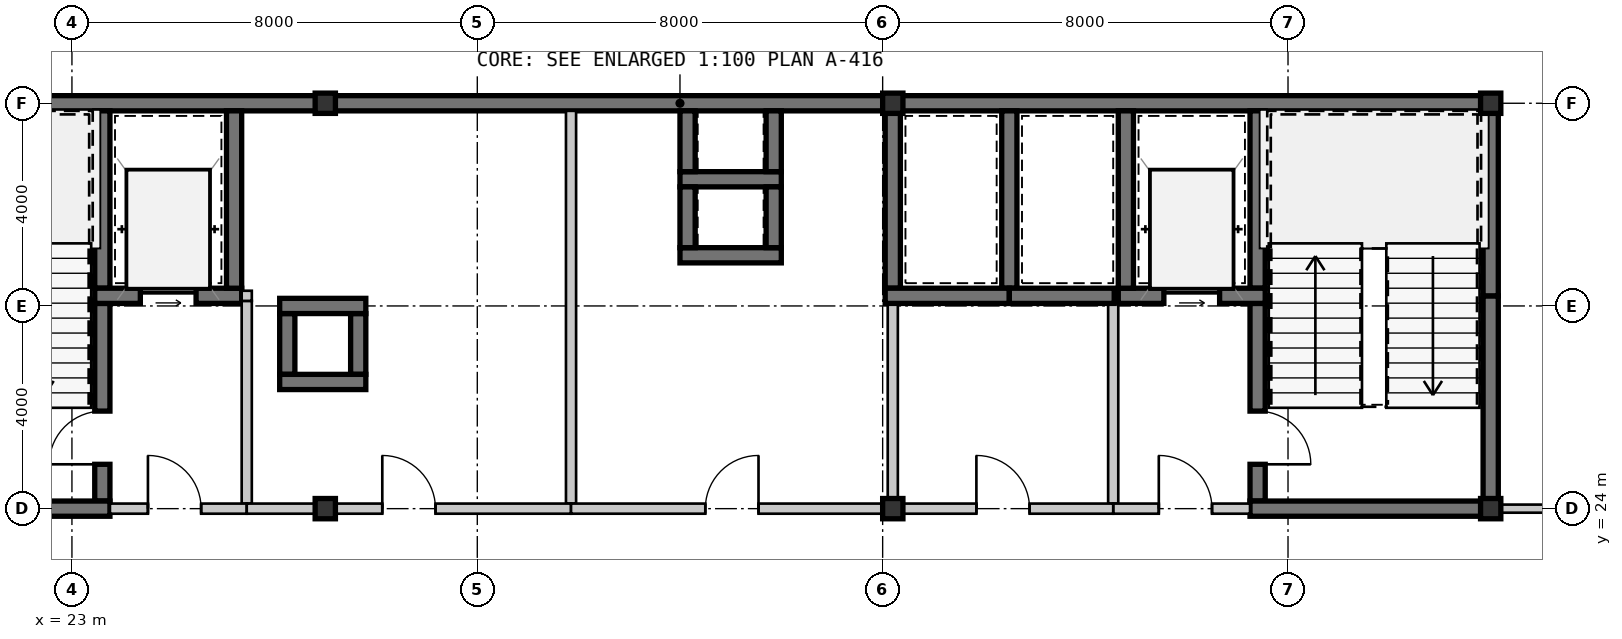
"""IFC4 building model, lengths in metres.
Left out: names, types, materials, properties, quantities, classifications, styles, units other than length and angle.
Written with IfcOpenShell. Run it as: python <this file> out.ifc"""

import sys

from ifc_helpers import new_model, si_unit, direction, frame, frame_2d, origin, origin_2d, place, context, subcontext, project, spatial, rectangle, hollow_rectangle, extrude, source, transform, mapped, element, fill, save


model = new_model("IFC4")
c1 = context("Model", 3, precision=1e-05, world=origin(), true_north=direction((0.0, 1.0)))
c2 = subcontext(c1, "Body", "Model", "MODEL_VIEW")
j1 = project(units=[si_unit("LENGTHUNIT", "METRE"), si_unit("PLANEANGLEUNIT", "RADIAN")], contexts=[c1])
p1 = place(None, origin())
s1 = spatial("IfcSite", under=j1, at=p1, CompositionType="ELEMENT")
p2 = place(p1, origin())
s2 = spatial("IfcBuilding", under=s1, at=p2, CompositionType="ELEMENT")
p3 = place(p2, frame((0.0, 0.0, 164.5)))
s3 = spatial("IfcBuildingStorey", under=s2, at=p3, CompositionType="ELEMENT", Elevation=164.5)
m1 = source(origin(), c2, "Body", "SweptSolid", [
    extrude(hollow_rectangle(XDim=0.4, YDim=0.4, WallThickness=0.016, at=origin_2d()), origin(), (0.0, 0.0, 1.0), 4.2),
])
for number, where, z_axis, x_axis in (
    (1, (28.0, 24.0, 0.0), (0.0, 0.0, 1.0), (1.0, 0.0, 0.0)),
    (2, (39.2, 24.0, 0.0), (0.0, 0.0, 1.0), (1.0, 0.0, 0.0)),
    (3, (51.0, 24.0, 0.0), (0.0, 0.0, 1.0), (1.0, 0.0, 0.0)),
    (4, (28.0, 32.0, 0.0), (0.0, 0.0, 1.0), (1.0, 0.0, 0.0)),
    (5, (39.2, 32.0, 0.0), (0.0, 0.0, 1.0), (1.0, 0.0, 0.0)),
    (6, (51.0, 32.0, 0.0), (0.0, 0.0, 1.0), (1.0, 0.0, 0.0)),
):
    element("IfcColumn", number, at=place(p3, frame(where, z_axis=z_axis, x_axis=x_axis)), inside=s3, PredefinedType="COLUMN", context=c2, shape_type="MappedRepresentation", body=[
        mapped(m1, transform((0.0, 0.0, 0.0), scale=1.0)),
    ])
m2 = source(origin(), c2, "Body", "SweptSolid", [
    extrude(rectangle(XDim=9.15, YDim=0.3, at=frame_2d((4.575, 0.0))), origin(), (0.0, 0.0, 1.0), 3.78),
])
p4 = place(p3, frame((18.85, 32.0, 0.0), z_axis=(0.0, 0.0, 1.0), x_axis=(1.0, 0.0, 0.0)))
e7 = element("IfcWall", 7, at=p4, inside=s3, PredefinedType="SHEAR", context=c2, shape_type="MappedRepresentation", body=[
    mapped(m2, transform((0.0, 0.0, 0.0), scale=1.0)),
])
m3 = source(origin(), c2, "Body", "SweptSolid", [
    extrude(rectangle(XDim=11.2, YDim=0.3, at=frame_2d((5.6, 0.0))), origin(), (0.0, 0.0, 1.0), 3.78),
])
p5 = place(p3, frame((28.0, 32.0, 0.0), z_axis=(0.0, 0.0, 1.0), x_axis=(1.0, 0.0, 0.0)))
e8 = element("IfcWall", 8, at=p5, inside=s3, PredefinedType="SHEAR", context=c2, shape_type="MappedRepresentation", body=[
    mapped(m3, transform((0.0, 0.0, 0.0), scale=1.0)),
])
m4 = source(origin(), c2, "Body", "SweptSolid", [
    extrude(rectangle(XDim=11.95, YDim=0.3, at=frame_2d((5.975, 0.0))), origin(), (0.0, 0.0, 1.0), 3.78),
])
p6 = place(p3, frame((39.2, 32.0, 0.0), z_axis=(0.0, 0.0, 1.0), x_axis=(1.0, 0.0, 0.0)))
e9 = element("IfcWall", 9, at=p6, inside=s3, PredefinedType="SHEAR", context=c2, shape_type="MappedRepresentation", body=[
    mapped(m4, transform((0.0, 0.0, 0.0), scale=1.0)),
])
m5 = source(origin(), c2, "Body", "SweptSolid", [
    extrude(rectangle(XDim=4.05, YDim=0.3, at=frame_2d((2.025, 0.0))), origin(), (0.0, 0.0, 1.0), 3.78),
])
p7 = place(p3, frame((51.0, 24.15, 0.0), z_axis=(0.0, 0.0, 1.0), x_axis=(0.0, 1.0, 0.0)))
e10 = element("IfcWall", 10, at=p7, inside=s3, PredefinedType="SHEAR", context=c2, shape_type="MappedRepresentation", body=[
    mapped(m5, transform((0.0, 0.0, 0.0), scale=1.0)),
])
m6 = source(origin(), c2, "Body", "SweptSolid", [
    extrude(rectangle(XDim=3.65, YDim=0.3, at=frame_2d((1.825, 0.0))), origin(), (0.0, 0.0, 1.0), 3.78),
])
p8 = place(p3, frame((51.0, 28.2, 0.0), z_axis=(0.0, 0.0, 1.0), x_axis=(0.0, 1.0, 0.0)))
e11 = element("IfcWall", 11, at=p8, inside=s3, PredefinedType="SHEAR", context=c2, shape_type="MappedRepresentation", body=[
    mapped(m6, transform((0.0, 0.0, 0.0), scale=1.0)),
])
m7 = source(origin(), c2, "Body", "SweptSolid", [
    extrude(rectangle(XDim=3.5, YDim=0.3, at=frame_2d((1.75, 0.0))), origin(), (0.0, 0.0, 1.0), 3.78),
])
p9 = place(p3, frame((23.6, 28.35, 0.0), z_axis=(0.0, 0.0, 1.0), x_axis=(0.0, 1.0, 0.0)))
e12 = element("IfcWall", 12, at=p9, inside=s3, PredefinedType="SHEAR", context=c2, shape_type="MappedRepresentation", body=[
    mapped(m7, transform((0.0, 0.0, 0.0), scale=1.0)),
])
m8 = source(origin(), c2, "Body", "SweptSolid", [
    extrude(rectangle(XDim=3.9, YDim=0.3, at=frame_2d((1.95, 0.0))), origin(), (0.0, 0.0, 1.0), 3.78),
])
p10 = place(p3, frame((23.6, 24.15, 0.0), z_axis=(0.0, 0.0, 1.0), x_axis=(0.0, 1.0, 0.0)))
e13 = element("IfcWall", 13, at=p10, inside=s3, PredefinedType="SHEAR", context=c2, shape_type="MappedRepresentation", body=[
    mapped(m8, transform((0.0, 0.0, 0.0), scale=1.0)),
])
m9 = source(origin(), c2, "Body", "SweptSolid", [
    extrude(rectangle(XDim=1.05, YDim=2.1, at=frame_2d((0.525, 1.05))), frame((0.0, 0.16, 0.0), z_axis=(0.0, -1.0, 0.0), x_axis=(1.0, 0.0, 0.0)), (0.0, 0.0, 1.0), 0.32),
])
p11 = place(p10, frame((0.725, 0.0, 0.0)))
e14 = element("IfcOpeningElement", 14, at=p11, cuts=e13, PredefinedType="OPENING", context=c2, shape_type="MappedRepresentation", body=[
    mapped(m9, transform((0.0, 0.0, 0.0), scale=1.0)),
])
m10 = source(origin(), c2, "Body", "SweptSolid", [
    extrude(rectangle(XDim=4.9, YDim=0.3, at=frame_2d((2.45, 0.0))), origin(), (0.0, 0.0, 1.0), 3.78),
])
p12 = place(p3, frame((18.85, 24.0, 0.0), z_axis=(0.0, 0.0, 1.0), x_axis=(1.0, 0.0, 0.0)))
e15 = element("IfcWall", 15, at=p12, inside=s3, PredefinedType="SHEAR", context=c2, shape_type="MappedRepresentation", body=[
    mapped(m10, transform((0.0, 0.0, 0.0), scale=1.0)),
])
m11 = source(origin(), c2, "Body", "SweptSolid", [
    extrude(rectangle(XDim=2.9, YDim=0.3, at=frame_2d((1.45, 0.0))), origin(), (0.0, 0.0, 1.0), 3.78),
])
p13 = place(p3, frame((23.45, 28.2, 0.0), z_axis=(0.0, 0.0, 1.0), x_axis=(1.0, 0.0, 0.0)))
e16 = element("IfcWall", 16, at=p13, inside=s3, PredefinedType="SHEAR", context=c2, shape_type="MappedRepresentation", body=[
    mapped(m11, transform((0.0, 0.0, 0.0), scale=1.0)),
])
m12 = source(origin(), c2, "Body", "SweptSolid", [
    extrude(rectangle(XDim=1.1, YDim=2.15, at=frame_2d((0.55, 1.075))), frame((0.0, 0.16, 0.0), z_axis=(0.0, -1.0, 0.0), x_axis=(1.0, 0.0, 0.0)), (0.0, 0.0, 1.0), 0.32),
])
p14 = place(p13, frame((0.9, 0.0, 0.0)))
e17 = element("IfcOpeningElement", 17, at=p14, cuts=e16, PredefinedType="OPENING", context=c2, shape_type="MappedRepresentation", body=[
    mapped(m12, transform((0.0, 0.0, 0.0), scale=1.0)),
])
p15 = place(p3, frame((26.2, 28.35, 0.0), z_axis=(0.0, 0.0, 1.0), x_axis=(0.0, 1.0, 0.0)))
e18 = element("IfcWall", 18, at=p15, inside=s3, PredefinedType="SHEAR", context=c2, shape_type="MappedRepresentation", body=[
    mapped(m7, transform((0.0, 0.0, 0.0), scale=1.0)),
])
m13 = source(origin(), c2, "Body", "SweptSolid", [
    extrude(rectangle(XDim=4.0, YDim=0.2, at=frame_2d((2.0, 0.0))), origin(), (0.0, 0.0, 1.0), 3.78),
])
p16 = place(p3, frame((26.45, 24.1, 0.0), z_axis=(0.0, 0.0, 1.0), x_axis=(0.0, 1.0, 0.0)))
e19 = element("IfcWall", 19, at=p16, inside=s3, PredefinedType="SOLIDWALL", context=c2, shape_type="MappedRepresentation", body=[
    mapped(m13, transform((0.0, 0.0, 0.0), scale=1.0)),
])
m14 = source(origin(), c2, "Body", "SweptSolid", [
    extrude(rectangle(XDim=2.7, YDim=0.2, at=frame_2d((1.35, 0.0))), origin(), (0.0, 0.0, 1.0), 3.32),
])
p17 = place(p3, frame((23.75, 24.0, 0.0), z_axis=(0.0, 0.0, 1.0), x_axis=(1.0, 0.0, 0.0)))
e20 = element("IfcWall", 20, at=p17, inside=s3, PredefinedType="SOLIDWALL", context=c2, shape_type="MappedRepresentation", body=[
    mapped(m14, transform((0.0, 0.0, 0.0), scale=1.0)),
])
m15 = source(origin(), c2, "Body", "SweptSolid", [
    extrude(rectangle(XDim=1.05, YDim=2.1, at=frame_2d((0.525, 1.05))), frame((0.0, 0.11, 0.0), z_axis=(0.0, -1.0, 0.0), x_axis=(1.0, 0.0, 0.0)), (0.0, 0.0, 1.0), 0.22),
])
p18 = place(p17, frame((0.75, 0.0, 0.0)))
e21 = element("IfcOpeningElement", 21, at=p18, cuts=e20, PredefinedType="OPENING", context=c2, shape_type="MappedRepresentation", body=[
    mapped(m15, transform((0.0, 0.0, 0.0), scale=1.0)),
])
p19 = place(p3, frame((46.4, 31.85, 0.0), z_axis=(0.0, 0.0, 1.0), x_axis=(0.0, -1.0, 0.0)))
e22 = element("IfcWall", 22, at=p19, inside=s3, PredefinedType="SHEAR", context=c2, shape_type="MappedRepresentation", body=[
    mapped(m7, transform((0.0, 0.0, 0.0), scale=1.0)),
])
p20 = place(p3, frame((46.4, 28.05, 0.0), z_axis=(0.0, 0.0, 1.0), x_axis=(0.0, -1.0, 0.0)))
e23 = element("IfcWall", 23, at=p20, inside=s3, PredefinedType="SHEAR", context=c2, shape_type="MappedRepresentation", body=[
    mapped(m8, transform((0.0, 0.0, 0.0), scale=1.0)),
])
p21 = place(p20, frame((2.125, 0.0, 0.0)))
e24 = element("IfcOpeningElement", 24, at=p21, cuts=e23, PredefinedType="OPENING", context=c2, shape_type="MappedRepresentation", body=[
    mapped(m9, transform((0.0, 0.0, 0.0), scale=1.0)),
])
p22 = place(p3, frame((46.25, 24.0, 0.0), z_axis=(0.0, 0.0, 1.0), x_axis=(1.0, 0.0, 0.0)))
e25 = element("IfcWall", 25, at=p22, inside=s3, PredefinedType="SHEAR", context=c2, shape_type="MappedRepresentation", body=[
    mapped(m10, transform((0.0, 0.0, 0.0), scale=1.0)),
])
p23 = place(p3, frame((43.65, 28.2, 0.0), z_axis=(0.0, 0.0, 1.0), x_axis=(1.0, 0.0, 0.0)))
e26 = element("IfcWall", 26, at=p23, inside=s3, PredefinedType="SHEAR", context=c2, shape_type="MappedRepresentation", body=[
    mapped(m11, transform((0.0, 0.0, 0.0), scale=1.0)),
])
p24 = place(p23, frame((0.9, 0.0, 0.0)))
e27 = element("IfcOpeningElement", 27, at=p24, cuts=e26, PredefinedType="OPENING", context=c2, shape_type="MappedRepresentation", body=[
    mapped(m12, transform((0.0, 0.0, 0.0), scale=1.0)),
])
p25 = place(p3, frame((43.8, 31.85, 0.0), z_axis=(0.0, 0.0, 1.0), x_axis=(0.0, -1.0, 0.0)))
e28 = element("IfcWall", 28, at=p25, inside=s3, PredefinedType="SHEAR", context=c2, shape_type="MappedRepresentation", body=[
    mapped(m7, transform((0.0, 0.0, 0.0), scale=1.0)),
])
m16 = source(origin(), c2, "Body", "SweptSolid", [
    extrude(rectangle(XDim=3.95, YDim=0.2, at=frame_2d((1.975, 0.0))), origin(), (0.0, 0.0, 1.0), 3.78),
])
p26 = place(p3, frame((43.55, 28.05, 0.0), z_axis=(0.0, 0.0, 1.0), x_axis=(0.0, -1.0, 0.0)))
e29 = element("IfcWall", 29, at=p26, inside=s3, PredefinedType="SOLIDWALL", context=c2, shape_type="MappedRepresentation", body=[
    mapped(m16, transform((0.0, 0.0, 0.0), scale=1.0)),
])
m17 = source(origin(), c2, "Body", "SweptSolid", [
    extrude(rectangle(XDim=2.7, YDim=0.2, at=frame_2d((1.35, 0.0))), origin(), (0.0, 0.0, 1.0), 3.247),
])
p27 = place(p3, frame((43.55, 24.0, 0.0), z_axis=(0.0, 0.0, 1.0), x_axis=(1.0, 0.0, 0.0)))
e30 = element("IfcWall", 30, at=p27, inside=s3, PredefinedType="SOLIDWALL", context=c2, shape_type="MappedRepresentation", body=[
    mapped(m17, transform((0.0, 0.0, 0.0), scale=1.0)),
])
p28 = place(p27, frame((0.9, 0.0, 0.0)))
e31 = element("IfcOpeningElement", 31, at=p28, cuts=e30, PredefinedType="OPENING", context=c2, shape_type="MappedRepresentation", body=[
    mapped(m15, transform((0.0, 0.0, 0.0), scale=1.0)),
])
m18 = source(origin(), c2, "Body", "SweptSolid", [
    extrude(rectangle(XDim=2.0, YDim=0.3, at=frame_2d((1.0, 0.0))), origin(), (0.0, 0.0, 1.0), 3.78),
])
p29 = place(p3, frame((35.0, 30.5, 0.0), z_axis=(0.0, 0.0, 1.0), x_axis=(1.0, 0.0, 0.0)))
e32 = element("IfcWall", 32, at=p29, inside=s3, PredefinedType="SHEAR", context=c2, shape_type="MappedRepresentation", body=[
    mapped(m18, transform((0.0, 0.0, 0.0), scale=1.0)),
])
m19 = source(origin(), c2, "Body", "SweptSolid", [
    extrude(rectangle(XDim=1.2, YDim=0.3, at=frame_2d((0.6, 0.0))), origin(), (0.0, 0.0, 1.0), 3.78),
])
for number, where, z_axis, x_axis in (
    (33, (35.15, 31.85, 0.0), (0.0, 0.0, 1.0), (0.0, -1.0, 0.0)),
    (34, (36.85, 30.65, 0.0), (0.0, 0.0, 1.0), (0.0, 1.0, 0.0)),
):
    element("IfcWall", number, at=place(p3, frame(where, z_axis=z_axis, x_axis=x_axis)), inside=s3, PredefinedType="SHEAR", context=c2, shape_type="MappedRepresentation", body=[
        mapped(m19, transform((0.0, 0.0, 0.0), scale=1.0)),
    ])
p30 = place(p3, frame((35.0, 29.0, 0.0), z_axis=(0.0, 0.0, 1.0), x_axis=(1.0, 0.0, 0.0)))
e35 = element("IfcWall", 35, at=p30, inside=s3, PredefinedType="SHEAR", context=c2, shape_type="MappedRepresentation", body=[
    mapped(m18, transform((0.0, 0.0, 0.0), scale=1.0)),
])
for number, where, z_axis, x_axis in (
    (36, (35.15, 30.35, 0.0), (0.0, 0.0, 1.0), (0.0, -1.0, 0.0)),
    (37, (36.85, 29.15, 0.0), (0.0, 0.0, 1.0), (0.0, 1.0, 0.0)),
    (38, (28.65, 26.65, 0.0), (0.0, 0.0, 1.0), (0.0, 1.0, 0.0)),
    (39, (27.25, 27.85, 0.0), (0.0, 0.0, 1.0), (0.0, -1.0, 0.0)),
):
    element("IfcWall", number, at=place(p3, frame(where, z_axis=z_axis, x_axis=x_axis)), inside=s3, PredefinedType="SHEAR", context=c2, shape_type="MappedRepresentation", body=[
        mapped(m19, transform((0.0, 0.0, 0.0), scale=1.0)),
    ])
m20 = source(origin(), c2, "Body", "SweptSolid", [
    extrude(rectangle(XDim=1.7, YDim=0.3, at=frame_2d((0.85, 0.0))), origin(), (0.0, 0.0, 1.0), 3.78),
])
for number, where, z_axis, x_axis in (
    (40, (28.8, 28.0, 0.0), (0.0, 0.0, 1.0), (-1.0, 0.0, 0.0)),
    (41, (27.1, 26.5, 0.0), (0.0, 0.0, 1.0), (1.0, 0.0, 0.0)),
):
    element("IfcWall", number, at=place(p3, frame(where, z_axis=z_axis, x_axis=x_axis)), inside=s3, PredefinedType="SHEAR", context=c2, shape_type="MappedRepresentation", body=[
        mapped(m20, transform((0.0, 0.0, 0.0), scale=1.0)),
    ])
m21 = source(origin(), c2, "Body", "SweptSolid", [
    extrude(rectangle(XDim=7.75, YDim=0.2, at=frame_2d((3.875, 0.0))), origin(), (0.0, 0.0, 1.0), 3.78),
])
p31 = place(p3, frame((32.85, 31.85, 0.0), z_axis=(0.0, 0.0, 1.0), x_axis=(0.0, -1.0, 0.0)))
e42 = element("IfcWall", 42, at=p31, inside=s3, PredefinedType="SOLIDWALL", context=c2, shape_type="MappedRepresentation", body=[
    mapped(m21, transform((0.0, 0.0, 0.0), scale=1.0)),
])
m22 = source(origin(), c2, "Body", "SweptSolid", [
    extrude(rectangle(XDim=6.4, YDim=0.2, at=frame_2d((3.2, 0.0))), origin(), (0.0, 0.0, 1.0), 3.32),
])
p32 = place(p3, frame((32.85, 24.0, 0.0), z_axis=(0.0, 0.0, 1.0), x_axis=(-1.0, 0.0, 0.0)))
e43 = element("IfcWall", 43, at=p32, inside=s3, PredefinedType="SOLIDWALL", context=c2, shape_type="MappedRepresentation", body=[
    mapped(m22, transform((0.0, 0.0, 0.0), scale=1.0)),
])
p33 = place(p32, frame((2.675, 0.0, 0.0)))
e44 = element("IfcOpeningElement", 44, at=p33, cuts=e43, PredefinedType="OPENING", context=c2, shape_type="MappedRepresentation", body=[
    mapped(m15, transform((0.0, 0.0, 0.0), scale=1.0)),
])
p34 = place(p3, frame((39.2, 31.85, 0.0), z_axis=(0.0, 0.0, 1.0), x_axis=(0.0, -1.0, 0.0)))
e45 = element("IfcWall", 45, at=p34, inside=s3, PredefinedType="SHEAR", context=c2, shape_type="MappedRepresentation", body=[
    mapped(m7, transform((0.0, 0.0, 0.0), scale=1.0)),
])
m23 = source(origin(), c2, "Body", "SweptSolid", [
    extrude(rectangle(XDim=3.95, YDim=0.2, at=frame_2d((1.975, 0.0))), origin(), (0.0, 0.0, 1.0), 3.32),
])
p35 = place(p3, frame((39.2, 28.05, 0.0), z_axis=(0.0, 0.0, 1.0), x_axis=(0.0, -1.0, 0.0)))
e46 = element("IfcWall", 46, at=p35, inside=s3, PredefinedType="SOLIDWALL", context=c2, shape_type="MappedRepresentation", body=[
    mapped(m23, transform((0.0, 0.0, 0.0), scale=1.0)),
])
m24 = source(origin(), c2, "Body", "SweptSolid", [
    extrude(rectangle(XDim=6.35, YDim=0.2, at=frame_2d((3.175, 0.0))), origin(), (0.0, 0.0, 1.0), 3.32),
])
p36 = place(p3, frame((39.2, 24.0, 0.0), z_axis=(0.0, 0.0, 1.0), x_axis=(-1.0, 0.0, 0.0)))
e47 = element("IfcWall", 47, at=p36, inside=s3, PredefinedType="SOLIDWALL", context=c2, shape_type="MappedRepresentation", body=[
    mapped(m24, transform((0.0, 0.0, 0.0), scale=1.0)),
])
p37 = place(p36, frame((2.65, 0.0, 0.0)))
e48 = element("IfcOpeningElement", 48, at=p37, cuts=e47, PredefinedType="OPENING", context=c2, shape_type="MappedRepresentation", body=[
    mapped(m15, transform((0.0, 0.0, 0.0), scale=1.0)),
])
p38 = place(p3, frame((41.5, 28.35, 0.0), z_axis=(0.0, 0.0, 1.0), x_axis=(0.0, 1.0, 0.0)))
e49 = element("IfcWall", 49, at=p38, inside=s3, PredefinedType="SHEAR", context=c2, shape_type="MappedRepresentation", body=[
    mapped(m7, transform((0.0, 0.0, 0.0), scale=1.0)),
])
m25 = source(origin(), c2, "Body", "SweptSolid", [
    extrude(rectangle(XDim=2.45, YDim=0.3, at=frame_2d((1.225, 0.0))), origin(), (0.0, 0.0, 1.0), 3.78),
])
p39 = place(p3, frame((39.05, 28.2, 0.0), z_axis=(0.0, 0.0, 1.0), x_axis=(1.0, 0.0, 0.0)))
e50 = element("IfcWall", 50, at=p39, inside=s3, PredefinedType="SHEAR", context=c2, shape_type="MappedRepresentation", body=[
    mapped(m25, transform((0.0, 0.0, 0.0), scale=1.0)),
])
m26 = source(origin(), c2, "Body", "SweptSolid", [
    extrude(rectangle(XDim=2.07, YDim=0.3, at=frame_2d((1.035, 0.0))), origin(), (0.0, 0.0, 1.0), 3.78),
])
p40 = place(p3, frame((41.5, 28.2, 0.0), z_axis=(0.0, 0.0, 1.0), x_axis=(1.0, 0.0, 0.0)))
e51 = element("IfcWall", 51, at=p40, inside=s3, PredefinedType="SHEAR", context=c2, shape_type="MappedRepresentation", body=[
    mapped(m26, transform((0.0, 0.0, 0.0), scale=1.0)),
])
m27 = source(origin(), c2, "Body", "SweptSolid", [
    extrude(rectangle(XDim=4.35, YDim=0.2, at=frame_2d((2.175, 0.0))), origin(), (0.0, 0.0, 1.0), 3.247),
])
p41 = place(p3, frame((43.55, 24.0, 0.0), z_axis=(0.0, 0.0, 1.0), x_axis=(-1.0, 0.0, 0.0)))
e52 = element("IfcWall", 52, at=p41, inside=s3, PredefinedType="SOLIDWALL", context=c2, shape_type="MappedRepresentation", body=[
    mapped(m27, transform((0.0, 0.0, 0.0), scale=1.0)),
])
p42 = place(p41, frame((1.65, 0.0, 0.0)))
e53 = element("IfcOpeningElement", 53, at=p42, cuts=e52, PredefinedType="OPENING", context=c2, shape_type="MappedRepresentation", body=[
    mapped(m15, transform((0.0, 0.0, 0.0), scale=1.0)),
])
m28 = source(origin(), c2, "Body", "SweptSolid", [
    extrude(rectangle(XDim=1.041, YDim=0.16, at=frame_2d((0.521, 0.0))), origin(), (0.0, 0.0, 1.0), 2.28),
])
p43 = place(p3, frame((51.15, 24.0, 0.0), z_axis=(0.0, 0.0, 1.0), x_axis=(1.0, 0.0, 0.0)))
e54 = element("IfcWall", 54, at=p43, inside=s3, PredefinedType="PARTITIONING", context=c2, shape_type="MappedRepresentation", body=[
    mapped(m28, transform((0.0, 0.0, 0.0), scale=1.0)),
])
m29 = source(origin(), c2, "Body", "SweptSolid", [
    extrude(rectangle(XDim=0.2, YDim=0.2, at=frame_2d((0.1, 0.0))), origin(), (0.0, 0.0, 1.0), 3.78),
])
p44 = place(p3, frame((26.35, 28.2, 0.0), z_axis=(0.0, 0.0, 1.0), x_axis=(1.0, 0.0, 0.0)))
e55 = element("IfcWall", 55, at=p44, inside=s3, PredefinedType="SOLIDWALL", context=c2, shape_type="MappedRepresentation", body=[
    mapped(m29, transform((0.0, 0.0, 0.0), scale=1.0)),
])
m30 = source(origin(), c2, "Body", "SweptSolid", [
    extrude(rectangle(XDim=1.05, YDim=2.1, at=frame_2d((0.525, 1.05))), frame((0.0, 0.025, 0.0), z_axis=(0.0, -1.0, 0.0), x_axis=(1.0, 0.0, 0.0)), (0.0, 0.0, 1.0), 0.05),
])
p45 = place(p11, origin())
e56 = element("IfcDoor", 56, at=p45, inside=s3, OperationType="SINGLE_SWING_LEFT", PredefinedType="DOOR", context=c2, shape_type="MappedRepresentation", body=[
    mapped(m30, transform((0.0, 0.0, 0.0), scale=1.0)),
])
fill(e14, e56)
m31 = source(origin(), c2, "Body", "SweptSolid", [
    extrude(rectangle(XDim=1.1, YDim=2.15, at=frame_2d((0.55, 1.075))), frame((0.0, 0.025, 0.0), z_axis=(0.0, -1.0, 0.0), x_axis=(1.0, 0.0, 0.0)), (0.0, 0.0, 1.0), 0.05),
])
p46 = place(p14, origin())
e57 = element("IfcDoor", 57, at=p46, inside=s3, OperationType="SLIDING_TO_LEFT", PredefinedType="DOOR", context=c2, shape_type="MappedRepresentation", body=[
    mapped(m31, transform((0.0, 0.0, 0.0), scale=1.0)),
])
fill(e17, e57)
p47 = place(p18, origin())
e58 = element("IfcDoor", 58, at=p47, inside=s3, OperationType="SINGLE_SWING_LEFT", PredefinedType="DOOR", context=c2, shape_type="MappedRepresentation", body=[
    mapped(m30, transform((0.0, 0.0, 0.0), scale=1.0)),
])
fill(e21, e58)
p48 = place(p21, origin())
e59 = element("IfcDoor", 59, at=p48, inside=s3, OperationType="SINGLE_SWING_RIGHT", PredefinedType="DOOR", context=c2, shape_type="MappedRepresentation", body=[
    mapped(m30, transform((0.0, 0.0, 0.0), scale=1.0)),
])
fill(e24, e59)
p49 = place(p24, origin())
e60 = element("IfcDoor", 60, at=p49, inside=s3, OperationType="SLIDING_TO_LEFT", PredefinedType="DOOR", context=c2, shape_type="MappedRepresentation", body=[
    mapped(m31, transform((0.0, 0.0, 0.0), scale=1.0)),
])
fill(e27, e60)
p50 = place(p28, origin())
e61 = element("IfcDoor", 61, at=p50, inside=s3, OperationType="SINGLE_SWING_LEFT", PredefinedType="DOOR", context=c2, shape_type="MappedRepresentation", body=[
    mapped(m30, transform((0.0, 0.0, 0.0), scale=1.0)),
])
fill(e31, e61)
p51 = place(p33, frame((1.05, 0.0, 0.0), z_axis=(0.0, 0.0, 1.0), x_axis=(-1.0, 0.0, 0.0)))
e62 = element("IfcDoor", 62, at=p51, inside=s3, OperationType="SINGLE_SWING_LEFT", PredefinedType="DOOR", context=c2, shape_type="MappedRepresentation", body=[
    mapped(m30, transform((0.0, 0.0, 0.0), scale=1.0)),
])
fill(e44, e62)
p52 = place(p37, frame((1.05, 0.0, 0.0), z_axis=(0.0, 0.0, 1.0), x_axis=(-1.0, 0.0, 0.0)))
e63 = element("IfcDoor", 63, at=p52, inside=s3, OperationType="SINGLE_SWING_RIGHT", PredefinedType="DOOR", context=c2, shape_type="MappedRepresentation", body=[
    mapped(m30, transform((0.0, 0.0, 0.0), scale=1.0)),
])
fill(e48, e63)
p53 = place(p42, frame((1.05, 0.0, 0.0), z_axis=(0.0, 0.0, 1.0), x_axis=(-1.0, 0.0, 0.0)))
e64 = element("IfcDoor", 64, at=p53, inside=s3, OperationType="SINGLE_SWING_LEFT", PredefinedType="DOOR", context=c2, shape_type="MappedRepresentation", body=[
    mapped(m30, transform((0.0, 0.0, 0.0), scale=1.0)),
])
fill(e53, e64)
save(model, sys.argv[1])
